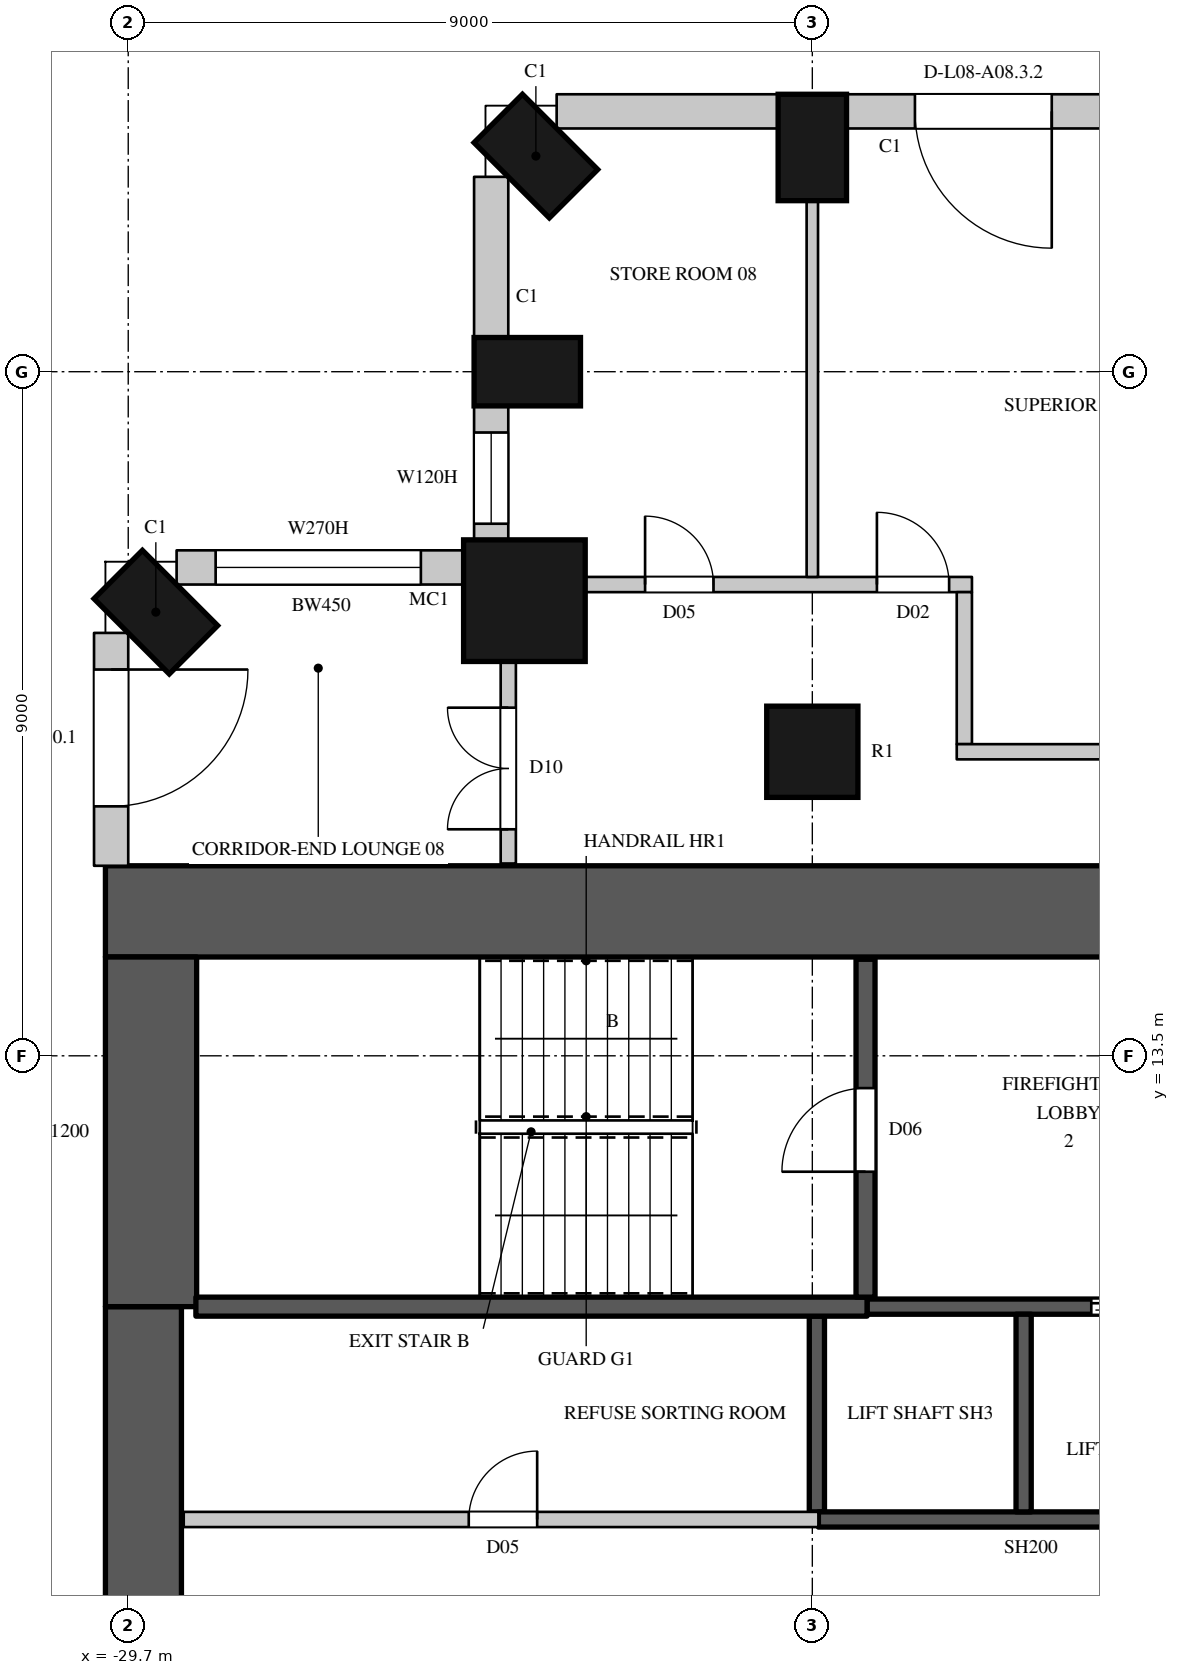
"""IFC4 building model, lengths in metres.
Left out: names, types, materials, properties, quantities, classifications, styles, units other than length and angle.
Written with IfcOpenShell. Run it as: python <this file> out.ifc"""

import sys

from ifc_helpers import new_model, si_unit, direction, frame, frame_2d, origin, origin_2d, place, context, subcontext, project, spatial, rectangle, circle, extrude, element, fill, save


model = new_model("IFC4")
c1 = context("Model", 3, precision=1e-05, world=origin(), true_north=direction((0.0, 1.0)))
c2 = subcontext(c1, "Body", "Model", "MODEL_VIEW")
j1 = project(units=[si_unit("LENGTHUNIT", "METRE"), si_unit("PLANEANGLEUNIT", "RADIAN")], contexts=[c1])
p1 = place(None, origin())
s1 = spatial("IfcSite", under=j1, at=p1, CompositionType="ELEMENT")
p2 = place(p1, origin())
s2 = spatial("IfcBuilding", under=s1, at=p2, CompositionType="ELEMENT")
p3 = place(p2, frame((0.0, 0.0, 59.1)))
s3 = spatial("IfcBuildingStorey", under=s2, at=p3, CompositionType="ELEMENT", Elevation=59.1)
for number, where, z_axis, x_axis in (
    (1, (-29.337, 19.337, 0.0), (0.0, 0.0, 1.0), (-0.707, -0.707, 0.0)),
    (2, (-20.7, 25.45, 0.0), (0.0, 0.0, 1.0), (-1.0, 0.0, 0.0)),
    (3, (-24.337, 25.337, 0.0), (0.0, 0.0, 1.0), (-0.707, -0.707, 0.0)),
    (4, (-24.45, 22.5, 0.0), (0.0, 0.0, 1.0), (0.0, -1.0, 0.0)),
):
    element("IfcColumn", number, at=place(p3, frame(where, z_axis=z_axis, x_axis=x_axis)), inside=s3, PredefinedType="COLUMN", context=c2, shape_type="SweptSolid", body=[
        extrude(rectangle(XDim=0.9, YDim=1.4, at=origin_2d()), origin(), (0.0, 0.0, 1.0), 3.6),
    ])
p4 = place(p3, frame((-24.488, 19.488, 0.0), z_axis=(0.0, 0.0, 1.0), x_axis=(1.0, 0.0, 0.0)))
e5 = element("IfcColumn", 5, at=p4, inside=s3, PredefinedType="COLUMN", context=c2, shape_type="SweptSolid", body=[
    extrude(circle(Radius=0.8, at=origin_2d()), origin(), (0.0, 0.0, 1.0), 3.6),
])
p5 = place(p3, frame((-20.7, 17.5, 0.0), z_axis=(0.0, 0.0, 1.0), x_axis=(1.0, 0.0, 0.0)))
e6 = element("IfcColumn", 6, at=p5, inside=s3, PredefinedType="COLUMN", context=c2, shape_type="SweptSolid", body=[
    extrude(circle(Radius=0.6, at=origin_2d()), origin(), (0.0, 0.0, 1.0), 3.6),
])
p6 = place(p3, frame((-29.925, 19.064, 0.0), z_axis=(0.0, 0.0, 1.0), x_axis=(0.0, -1.0, 0.0)))
e7 = element("IfcWall", 7, at=p6, inside=s3, PredefinedType="SOLIDWALL", context=c2, shape_type="SweptSolid", body=[
    extrude(rectangle(XDim=3.064, YDim=0.45, at=frame_2d((1.532, 0.0))), origin(), (0.0, 0.0, 1.0), 3.3),
])
p7 = place(p6, frame((0.482, 0.0, 0.0)))
e8 = element("IfcOpeningElement", 8, at=p7, cuts=e7, PredefinedType="OPENING", context=c2, shape_type="SweptSolid", body=[
    extrude(rectangle(XDim=1.8, YDim=2.4, at=frame_2d((0.9, 1.2))), frame((0.0, 0.235, 0.0), z_axis=(0.0, -1.0, 0.0), x_axis=(1.0, 0.0, 0.0)), (0.0, 0.0, 1.0), 0.47),
])
p8 = place(p3, frame((-12.15, 25.925, 0.0), z_axis=(0.0, 0.0, 1.0), x_axis=(-1.0, 0.0, 0.0)))
e9 = element("IfcWall", 9, at=p8, inside=s3, PredefinedType="SOLIDWALL", context=c2, shape_type="SweptSolid", body=[
    extrude(rectangle(XDim=8.1, YDim=0.45, at=frame_2d((4.05, 0.0))), origin(), (0.0, 0.0, 1.0), 3.3),
])
p9 = place(p8, frame((0.2, 0.0, 0.0)))
e10 = element("IfcOpeningElement", 10, at=p9, cuts=e9, PredefinedType="OPENING", context=c2, shape_type="SweptSolid", body=[
    extrude(rectangle(XDim=1.8, YDim=2.4, at=frame_2d((0.9, 1.2))), frame((0.0, 0.235, 0.0), z_axis=(0.0, -1.0, 0.0), x_axis=(1.0, 0.0, 0.0)), (0.0, 0.0, 1.0), 0.47),
])
p10 = place(p8, frame((2.2, 0.0, 1.05)))
e11 = element("IfcOpeningElement", 11, at=p10, cuts=e9, PredefinedType="OPENING", context=c2, shape_type="SweptSolid", body=[
    extrude(rectangle(XDim=1.2, YDim=2.0, at=frame_2d((0.6, 1.0))), frame((0.0, 0.235, 0.0), z_axis=(0.0, -1.0, 0.0), x_axis=(1.0, 0.0, 0.0)), (0.0, 0.0, 1.0), 0.47),
])
p11 = place(p8, frame((5.4, 0.0, 0.0)))
e12 = element("IfcOpeningElement", 12, at=p11, cuts=e9, PredefinedType="OPENING", context=c2, shape_type="SweptSolid", body=[
    extrude(rectangle(XDim=1.8, YDim=2.4, at=frame_2d((0.9, 1.2))), frame((0.0, 0.235, 0.0), z_axis=(0.0, -1.0, 0.0), x_axis=(1.0, 0.0, 0.0)), (0.0, 0.0, 1.0), 0.47),
])
p12 = place(p3, frame((-21.15, 25.925, 0.0), z_axis=(0.0, 0.0, 1.0), x_axis=(-1.0, 0.0, 0.0)))
e13 = element("IfcWall", 13, at=p12, inside=s3, PredefinedType="SOLIDWALL", context=c2, shape_type="SweptSolid", body=[
    extrude(rectangle(XDim=2.914, YDim=0.45, at=frame_2d((1.457, 0.0))), origin(), (0.0, 0.0, 1.0), 3.3),
])
p13 = place(p3, frame((-24.925, 25.064, 0.0), z_axis=(0.0, 0.0, 1.0), x_axis=(0.0, -1.0, 0.0)))
e14 = element("IfcWall", 14, at=p13, inside=s3, PredefinedType="SOLIDWALL", context=c2, shape_type="SweptSolid", body=[
    extrude(rectangle(XDim=2.114, YDim=0.45, at=frame_2d((1.057, 0.0))), origin(), (0.0, 0.0, 1.0), 3.3),
])
p14 = place(p3, frame((-24.925, 22.05, 0.0), z_axis=(0.0, 0.0, 1.0), x_axis=(0.0, -1.0, 0.0)))
e15 = element("IfcWall", 15, at=p14, inside=s3, PredefinedType="SOLIDWALL", context=c2, shape_type="SweptSolid", body=[
    extrude(rectangle(XDim=1.792, YDim=0.45, at=frame_2d((0.896, 0.0))), origin(), (0.0, 0.0, 1.0), 3.3),
])
p15 = place(p14, frame((0.35, 0.0, 1.05)))
e16 = element("IfcOpeningElement", 16, at=p15, cuts=e15, PredefinedType="OPENING", context=c2, shape_type="SweptSolid", body=[
    extrude(rectangle(XDim=1.2, YDim=2.0, at=frame_2d((0.6, 1.0))), frame((0.0, 0.235, 0.0), z_axis=(0.0, -1.0, 0.0), x_axis=(1.0, 0.0, 0.0)), (0.0, 0.0, 1.0), 0.47),
])
p16 = place(p3, frame((-25.259, 19.925, 0.0), z_axis=(0.0, 0.0, 1.0), x_axis=(-1.0, 0.0, 0.0)))
e17 = element("IfcWall", 17, at=p16, inside=s3, PredefinedType="SOLIDWALL", context=c2, shape_type="SweptSolid", body=[
    extrude(rectangle(XDim=3.805, YDim=0.45, at=frame_2d((1.903, 0.0))), origin(), (0.0, 0.0, 1.0), 3.3),
])
p17 = place(p16, frame((0.592, 0.0, 1.05)))
e18 = element("IfcOpeningElement", 18, at=p17, cuts=e17, PredefinedType="OPENING", context=c2, shape_type="SweptSolid", body=[
    extrude(rectangle(XDim=2.7, YDim=2.0, at=frame_2d((1.35, 1.0))), frame((0.0, 0.235, 0.0), z_axis=(0.0, -1.0, 0.0), x_axis=(1.0, 0.0, 0.0)), (0.0, 0.0, 1.0), 0.47),
])
p18 = place(p3, frame((-30.0, 15.4, 0.0), z_axis=(0.0, 0.0, 1.0), x_axis=(1.0, 0.0, 0.0)))
e19 = element("IfcWall", 19, at=p18, inside=s3, PredefinedType="SHEAR", context=c2, shape_type="SweptSolid", body=[
    extrude(rectangle(XDim=16.0, YDim=1.2, at=frame_2d((8.0, 0.0))), origin(), (0.0, 0.0, 1.0), 3.6),
])
p19 = place(p18, frame((13.4, 0.0, 0.0)))
e20 = element("IfcOpeningElement", 20, at=p19, cuts=e19, PredefinedType="OPENING", context=c2, shape_type="SweptSolid", body=[
    extrude(rectangle(XDim=1.5, YDim=2.4, at=frame_2d((0.75, 1.2))), frame((0.0, 0.61, 0.0), z_axis=(0.0, -1.0, 0.0), x_axis=(1.0, 0.0, 0.0)), (0.0, 0.0, 1.0), 1.22),
])
p20 = place(p3, frame((-29.5, -10.2, 0.0), z_axis=(0.0, 0.0, 1.0), x_axis=(0.0, 1.0, 0.0)))
e21 = element("IfcWall", 21, at=p20, inside=s3, PredefinedType="SHEAR", context=c2, shape_type="SweptSolid", body=[
    extrude(rectangle(XDim=20.4, YDim=1.0, at=frame_2d((10.2, 0.0))), origin(), (0.0, 0.0, 1.0), 3.6),
])
p21 = place(p3, frame((-29.4, 10.2, 0.0), z_axis=(0.0, 0.0, 1.0), x_axis=(0.0, 1.0, 0.0)))
e22 = element("IfcWall", 22, at=p21, inside=s3, PredefinedType="SHEAR", context=c2, shape_type="SweptSolid", body=[
    extrude(rectangle(XDim=4.6, YDim=1.2, at=frame_2d((2.3, 0.0))), origin(), (0.0, 0.0, 1.0), 3.6),
])
p22 = place(p3, frame((-28.97, 7.4, 0.0), z_axis=(0.0, 0.0, 1.0), x_axis=(1.0, 0.0, 0.0)))
e23 = element("IfcWall", 23, at=p22, inside=s3, PredefinedType="PARTITIONING", context=c2, shape_type="SweptSolid", body=[
    extrude(rectangle(XDim=8.35, YDim=0.2, at=frame_2d((4.175, 0.0))), origin(), (0.0, 0.0, 1.0), 3.3),
])
p23 = place(p22, frame((3.75, 0.0, 0.0)))
e24 = element("IfcOpeningElement", 24, at=p23, cuts=e23, PredefinedType="OPENING", context=c2, shape_type="SweptSolid", body=[
    extrude(rectangle(XDim=0.9, YDim=2.2, at=frame_2d((0.45, 1.1))), frame((0.0, 0.11, 0.0), z_axis=(0.0, -1.0, 0.0), x_axis=(1.0, 0.0, 0.0)), (0.0, 0.0, 1.0), 0.22),
])
p24 = place(p3, frame((-24.7, 16.03, 0.0), z_axis=(0.0, 0.0, 1.0), x_axis=(0.0, 1.0, 0.0)))
e25 = element("IfcWall", 25, at=p24, inside=s3, PredefinedType="PARTITIONING", context=c2, shape_type="SweptSolid", body=[
    extrude(rectangle(XDim=2.67, YDim=0.2, at=frame_2d((1.335, 0.0))), origin(), (0.0, 0.0, 1.0), 3.3),
])
p25 = place(p24, frame((0.45, 0.0, 0.0)))
e26 = element("IfcOpeningElement", 26, at=p25, cuts=e25, PredefinedType="OPENING", context=c2, shape_type="SweptSolid", body=[
    extrude(rectangle(XDim=1.6, YDim=2.4, at=frame_2d((0.8, 1.2))), frame((0.0, 0.11, 0.0), z_axis=(0.0, -1.0, 0.0), x_axis=(1.0, 0.0, 0.0)), (0.0, 0.0, 1.0), 0.22),
])
p26 = place(p3, frame((-23.7, 19.7, 0.0), z_axis=(0.0, 0.0, 1.0), x_axis=(1.0, 0.0, 0.0)))
e27 = element("IfcWall", 27, at=p26, inside=s3, PredefinedType="PARTITIONING", context=c2, shape_type="SweptSolid", body=[
    extrude(rectangle(XDim=5.1, YDim=0.2, at=frame_2d((2.55, 0.0))), origin(), (0.0, 0.0, 1.0), 3.3),
])
p27 = place(p26, frame((0.8, 0.0, 0.0)))
e28 = element("IfcOpeningElement", 28, at=p27, cuts=e27, PredefinedType="OPENING", context=c2, shape_type="SweptSolid", body=[
    extrude(rectangle(XDim=0.9, YDim=2.2, at=frame_2d((0.45, 1.1))), frame((0.0, 0.11, 0.0), z_axis=(0.0, -1.0, 0.0), x_axis=(1.0, 0.0, 0.0)), (0.0, 0.0, 1.0), 0.22),
])
p28 = place(p26, frame((3.85, 0.0, 0.0)))
e29 = element("IfcOpeningElement", 29, at=p28, cuts=e27, PredefinedType="OPENING", context=c2, shape_type="SweptSolid", body=[
    extrude(rectangle(XDim=0.95, YDim=2.2, at=frame_2d((0.475, 1.1))), frame((0.0, 0.11, 0.0), z_axis=(0.0, -1.0, 0.0), x_axis=(1.0, 0.0, 0.0)), (0.0, 0.0, 1.0), 0.22),
])
p29 = place(p3, frame((-18.7, 17.6, 0.0), z_axis=(0.0, 0.0, 1.0), x_axis=(0.0, 1.0, 0.0)))
e30 = element("IfcWall", 30, at=p29, inside=s3, PredefinedType="PARTITIONING", context=c2, shape_type="SweptSolid", body=[
    extrude(rectangle(XDim=2.0, YDim=0.2, at=frame_2d((1.0, 0.0))), origin(), (0.0, 0.0, 1.0), 3.3),
])
p30 = place(p3, frame((-18.8, 17.5, 0.0), z_axis=(0.0, 0.0, 1.0), x_axis=(1.0, 0.0, 0.0)))
e31 = element("IfcWall", 31, at=p30, inside=s3, PredefinedType="PARTITIONING", context=c2, shape_type="SweptSolid", body=[
    extrude(rectangle(XDim=6.5, YDim=0.2, at=frame_2d((3.25, 0.0))), origin(), (0.0, 0.0, 1.0), 2.75),
])
p31 = place(p3, frame((-20.7, 19.8, 0.0), z_axis=(0.0, 0.0, 1.0), x_axis=(0.0, 1.0, 0.0)))
e32 = element("IfcWall", 32, at=p31, inside=s3, PredefinedType="PARTITIONING", context=c2, shape_type="SweptSolid", body=[
    extrude(rectangle(XDim=4.95, YDim=0.15, at=frame_2d((2.475, 0.0))), origin(), (0.0, 0.0, 1.0), 2.75),
])
p32 = place(p3, frame((-20.64, 7.5, 0.0), z_axis=(0.0, 0.0, 1.0), x_axis=(0.0, 1.0, 0.0)))
e33 = element("IfcWall", 33, at=p32, inside=s3, PredefinedType="SHEAR", context=c2, shape_type="SweptSolid", body=[
    extrude(rectangle(XDim=2.575, YDim=0.2, at=frame_2d((1.288, 0.0))), origin(), (0.0, 0.0, 1.0), 3.3),
])
p33 = place(p3, frame((-20.62, 7.4, 0.0), z_axis=(0.0, 0.0, 1.0), x_axis=(1.0, 0.0, 0.0)))
e34 = element("IfcWall", 34, at=p33, inside=s3, PredefinedType="SHEAR", context=c2, shape_type="SweptSolid", body=[
    extrude(rectangle(XDim=5.59, YDim=0.2, at=frame_2d((2.795, 0.0))), origin(), (0.0, 0.0, 1.0), 3.3),
])
p34 = place(p3, frame((-19.98, 10.2, 0.0), z_axis=(0.0, 0.0, 1.0), x_axis=(1.0, 0.0, 0.0)))
e35 = element("IfcWall", 35, at=p34, inside=s3, PredefinedType="SHEAR", context=c2, shape_type="SweptSolid", body=[
    extrude(rectangle(XDim=4.95, YDim=0.2, at=frame_2d((2.475, 0.0))), origin(), (0.0, 0.0, 1.0), 3.3),
])
p35 = place(p34, frame((2.95, 0.0, 0.0)))
e36 = element("IfcOpeningElement", 36, at=p35, cuts=e35, PredefinedType="OPENING", context=c2, shape_type="SweptSolid", body=[
    extrude(rectangle(XDim=1.1, YDim=2.2, at=frame_2d((0.55, 1.1))), frame((0.0, 0.11, 0.0), z_axis=(0.0, -1.0, 0.0), x_axis=(1.0, 0.0, 0.0)), (0.0, 0.0, 1.0), 0.22),
])
p36 = place(p3, frame((-17.92, 7.5, 0.0), z_axis=(0.0, 0.0, 1.0), x_axis=(0.0, 1.0, 0.0)))
e37 = element("IfcWall", 37, at=p36, inside=s3, PredefinedType="SHEAR", context=c2, shape_type="SweptSolid", body=[
    extrude(rectangle(XDim=2.6, YDim=0.2, at=frame_2d((1.3, 0.0))), origin(), (0.0, 0.0, 1.0), 3.6),
])
p37 = place(p3, frame((-28.81, 10.2, 0.0), z_axis=(0.0, 0.0, 1.0), x_axis=(1.0, 0.0, 0.0)))
e38 = element("IfcWall", 38, at=p37, inside=s3, PredefinedType="SHEAR", context=c2, shape_type="SweptSolid", body=[
    extrude(rectangle(XDim=8.83, YDim=0.25, at=frame_2d((4.415, 0.0))), origin(), (0.0, 0.0, 1.0), 3.3),
])
p38 = place(p3, frame((-20.0, 10.325, 0.0), z_axis=(0.0, 0.0, 1.0), x_axis=(0.0, 1.0, 0.0)))
e39 = element("IfcWall", 39, at=p38, inside=s3, PredefinedType="SHEAR", context=c2, shape_type="SweptSolid", body=[
    extrude(rectangle(XDim=4.445, YDim=0.25, at=frame_2d((2.223, 0.0))), origin(), (0.0, 0.0, 1.0), 3.3),
])
p39 = place(p38, frame((1.65, 0.0, 0.0)))
e40 = element("IfcOpeningElement", 40, at=p39, cuts=e39, PredefinedType="OPENING", context=c2, shape_type="SweptSolid", body=[
    extrude(rectangle(XDim=1.1, YDim=2.2, at=frame_2d((0.55, 1.1))), frame((0.0, 0.135, 0.0), z_axis=(0.0, -1.0, 0.0), x_axis=(1.0, 0.0, 0.0)), (0.0, 0.0, 1.0), 0.27),
])
p40 = place(p7, origin())
e41 = element("IfcDoor", 41, at=p40, inside=s3, OperationType="SLIDING_TO_LEFT", PredefinedType="DOOR", context=c2, shape_type="SweptSolid", body=[
    extrude(rectangle(XDim=1.8, YDim=2.4, at=frame_2d((0.9, 1.2))), frame((0.0, 0.13, 0.0), z_axis=(0.0, -1.0, 0.0), x_axis=(1.0, 0.0, 0.0)), (0.0, 0.0, 1.0), 0.05),
])
fill(e8, e41)
p41 = place(p11, origin())
e42 = element("IfcDoor", 42, at=p41, inside=s3, OperationType="SLIDING_TO_LEFT", PredefinedType="DOOR", context=c2, shape_type="SweptSolid", body=[
    extrude(rectangle(XDim=1.8, YDim=2.4, at=frame_2d((0.9, 1.2))), frame((0.0, 0.13, 0.0), z_axis=(0.0, -1.0, 0.0), x_axis=(1.0, 0.0, 0.0)), (0.0, 0.0, 1.0), 0.05),
])
fill(e12, e42)
p42 = place(p15, origin())
e43 = element("IfcWindow", 43, at=p42, inside=s3, PartitioningType="SINGLE_PANEL", PredefinedType="WINDOW", context=c2, shape_type="SweptSolid", body=[
    extrude(rectangle(XDim=1.2, YDim=2.0, at=frame_2d((0.6, 1.0))), frame((0.0, 0.135, 0.0), z_axis=(0.0, -1.0, 0.0), x_axis=(1.0, 0.0, 0.0)), (0.0, 0.0, 1.0), 0.06),
])
fill(e16, e43)
p43 = place(p17, origin())
e44 = element("IfcWindow", 44, at=p43, inside=s3, PartitioningType="SINGLE_PANEL", PredefinedType="WINDOW", context=c2, shape_type="SweptSolid", body=[
    extrude(rectangle(XDim=2.7, YDim=2.0, at=frame_2d((1.35, 1.0))), frame((0.0, 0.135, 0.0), z_axis=(0.0, -1.0, 0.0), x_axis=(1.0, 0.0, 0.0)), (0.0, 0.0, 1.0), 0.06),
])
fill(e18, e44)
p44 = place(p39, origin())
e45 = element("IfcDoor", 45, at=p44, inside=s3, OperationType="SINGLE_SWING_LEFT", PredefinedType="DOOR", context=c2, shape_type="SweptSolid", body=[
    extrude(rectangle(XDim=1.1, YDim=2.2, at=frame_2d((0.55, 1.1))), frame((0.0, 0.025, 0.0), z_axis=(0.0, -1.0, 0.0), x_axis=(1.0, 0.0, 0.0)), (0.0, 0.0, 1.0), 0.05),
])
fill(e40, e45)
p45 = place(p23, origin())
e46 = element("IfcDoor", 46, at=p45, inside=s3, OperationType="SINGLE_SWING_RIGHT", PredefinedType="DOOR", context=c2, shape_type="SweptSolid", body=[
    extrude(rectangle(XDim=0.9, YDim=2.2, at=frame_2d((0.45, 1.1))), frame((0.0, 0.025, 0.0), z_axis=(0.0, -1.0, 0.0), x_axis=(1.0, 0.0, 0.0)), (0.0, 0.0, 1.0), 0.05),
])
fill(e24, e46)
p46 = place(p35, origin())
e47 = element("IfcDoor", 47, at=p46, inside=s3, OperationType="DOUBLE_DOOR_SLIDING", PredefinedType="DOOR", context=c2, shape_type="SweptSolid", body=[
    extrude(rectangle(XDim=1.1, YDim=2.2, at=frame_2d((0.55, 1.1))), frame((0.0, 0.025, 0.0), z_axis=(0.0, -1.0, 0.0), x_axis=(1.0, 0.0, 0.0)), (0.0, 0.0, 1.0), 0.05),
])
fill(e36, e47)
p47 = place(p27, origin())
e48 = element("IfcDoor", 48, at=p47, inside=s3, OperationType="SINGLE_SWING_LEFT", PredefinedType="DOOR", context=c2, shape_type="SweptSolid", body=[
    extrude(rectangle(XDim=0.9, YDim=2.2, at=frame_2d((0.45, 1.1))), frame((0.0, 0.025, 0.0), z_axis=(0.0, -1.0, 0.0), x_axis=(1.0, 0.0, 0.0)), (0.0, 0.0, 1.0), 0.05),
])
fill(e28, e48)
p48 = place(p25, origin())
e49 = element("IfcDoor", 49, at=p48, inside=s3, OperationType="DOUBLE_DOOR_SINGLE_SWING", PredefinedType="DOOR", context=c2, shape_type="SweptSolid", body=[
    extrude(rectangle(XDim=1.6, YDim=2.4, at=frame_2d((0.8, 1.2))), frame((0.0, 0.025, 0.0), z_axis=(0.0, -1.0, 0.0), x_axis=(1.0, 0.0, 0.0)), (0.0, 0.0, 1.0), 0.05),
])
fill(e26, e49)
p49 = place(p28, origin())
e50 = element("IfcDoor", 50, at=p49, inside=s3, OperationType="SINGLE_SWING_LEFT", PredefinedType="DOOR", context=c2, shape_type="SweptSolid", body=[
    extrude(rectangle(XDim=0.95, YDim=2.2, at=frame_2d((0.475, 1.1))), frame((0.0, 0.025, 0.0), z_axis=(0.0, -1.0, 0.0), x_axis=(1.0, 0.0, 0.0)), (0.0, 0.0, 1.0), 0.05),
])
fill(e29, e50)
save(model, sys.argv[1])
